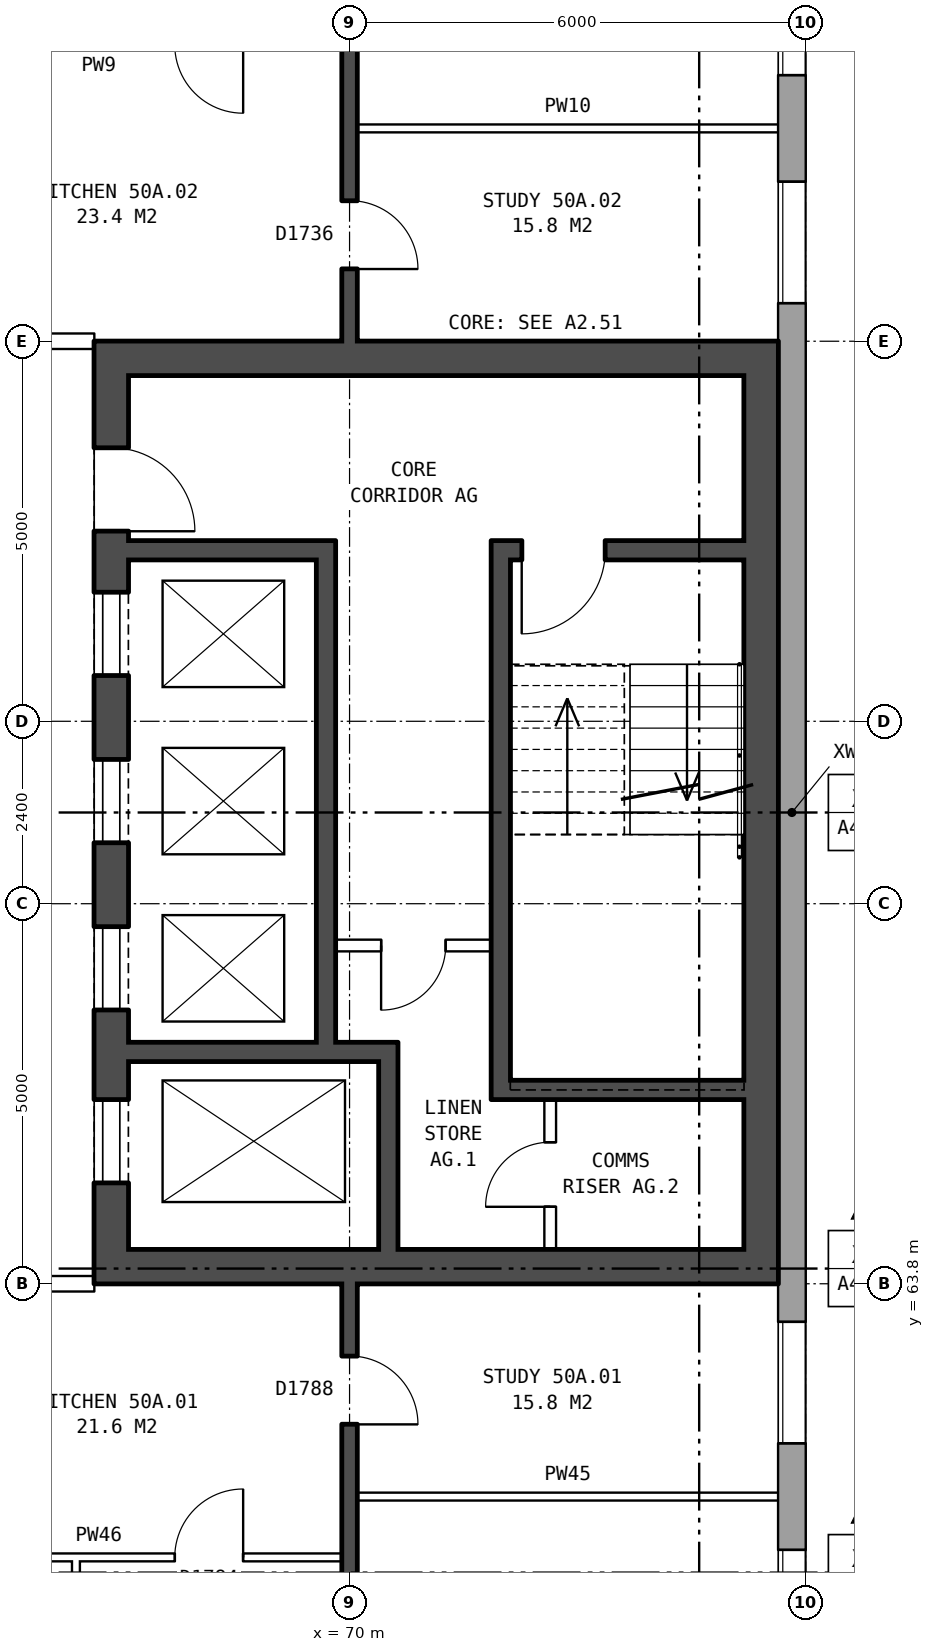
"""IFC4 building model, lengths in metres.
Left out: names, types, materials, properties, quantities, classifications, styles, units other than length and angle.
Written with IfcOpenShell. Run it as: python <this file> out.ifc"""

import sys

from ifc_helpers import new_model, si_unit, direction, frame, frame_2d, origin, place, context, subcontext, project, spatial, rectangle, extrude, element, fill, save


model = new_model("IFC4")
c1 = context("Model", 3, precision=1e-05, world=origin(), true_north=direction((0.0, 1.0)))
c2 = subcontext(c1, "Body", "Model", "MODEL_VIEW")
j1 = project(units=[si_unit("LENGTHUNIT", "METRE"), si_unit("PLANEANGLEUNIT", "RADIAN")], contexts=[c1])
p1 = place(None, origin())
s1 = spatial("IfcSite", under=j1, at=p1, CompositionType="ELEMENT")
p2 = place(p1, origin())
s2 = spatial("IfcBuilding", under=s1, at=p2, CompositionType="ELEMENT")
p3 = place(p2, frame((0.0, 0.0, 178.9)))
s3 = spatial("IfcBuildingStorey", under=s2, at=p3, CompositionType="ELEMENT", Elevation=178.9)
p4 = place(p3, frame((75.82, 57.075, 0.0), z_axis=(0.0, 0.0, 1.0), x_axis=(0.0, 1.0, 0.0)))
e1 = element("IfcWall", 1, at=p4, inside=s3, PredefinedType="STANDARD", context=c2, shape_type="SweptSolid", body=[
    extrude(rectangle(XDim=25.851, YDim=0.36, at=frame_2d((12.925, 0.0))), origin(), (0.0, 0.0, 1.0), 2.85),
])
p5 = place(p4, frame((1.625, 0.0, 0.8)))
e2 = element("IfcOpeningElement", 2, at=p5, cuts=e1, PredefinedType="OPENING", context=c2, shape_type="SweptSolid", body=[
    extrude(rectangle(XDim=1.6, YDim=1.8, at=frame_2d((0.8, 0.9))), frame((0.0, 0.19, 0.0), z_axis=(0.0, -1.0, 0.0), x_axis=(1.0, 0.0, 0.0)), (0.0, 0.0, 1.0), 0.38),
])
p6 = place(p4, frame((4.625, 0.0, 0.8)))
e3 = element("IfcOpeningElement", 3, at=p6, cuts=e1, PredefinedType="OPENING", context=c2, shape_type="SweptSolid", body=[
    extrude(rectangle(XDim=1.6, YDim=1.8, at=frame_2d((0.8, 0.9))), frame((0.0, 0.19, 0.0), z_axis=(0.0, -1.0, 0.0), x_axis=(1.0, 0.0, 0.0)), (0.0, 0.0, 1.0), 0.38),
])
p7 = place(p4, frame((19.625, 0.0, 0.8)))
e4 = element("IfcOpeningElement", 4, at=p7, cuts=e1, PredefinedType="OPENING", context=c2, shape_type="SweptSolid", body=[
    extrude(rectangle(XDim=1.6, YDim=1.8, at=frame_2d((0.8, 0.9))), frame((0.0, 0.19, 0.0), z_axis=(0.0, -1.0, 0.0), x_axis=(1.0, 0.0, 0.0)), (0.0, 0.0, 1.0), 0.38),
])
p8 = place(p4, frame((22.625, 0.0, 0.8)))
e5 = element("IfcOpeningElement", 5, at=p8, cuts=e1, PredefinedType="OPENING", context=c2, shape_type="SweptSolid", body=[
    extrude(rectangle(XDim=1.6, YDim=1.8, at=frame_2d((0.8, 0.9))), frame((0.0, 0.19, 0.0), z_axis=(0.0, -1.0, 0.0), x_axis=(1.0, 0.0, 0.0)), (0.0, 0.0, 1.0), 0.38),
])
p9 = place(p3, frame((66.865, 63.8, 0.0), z_axis=(0.0, 0.0, 1.0), x_axis=(0.0, 1.0, 0.0)))
e6 = element("IfcWall", 6, at=p9, inside=s3, PredefinedType="SHEAR", context=c2, shape_type="SweptSolid", body=[
    extrude(rectangle(XDim=12.4, YDim=0.45, at=frame_2d((6.2, 0.0))), origin(), (0.0, 0.0, 1.0), 2.85),
])
p10 = place(p9, frame((1.325, 0.0, 0.0)))
e7 = element("IfcOpeningElement", 7, at=p10, cuts=e6, PredefinedType="OPENING", context=c2, shape_type="SweptSolid", body=[
    extrude(rectangle(XDim=1.1, YDim=2.1, at=frame_2d((0.55, 1.05))), frame((0.0, 0.235, 0.0), z_axis=(0.0, -1.0, 0.0), x_axis=(1.0, 0.0, 0.0)), (0.0, 0.0, 1.0), 0.47),
])
p11 = place(p9, frame((3.6, 0.0, 0.0)))
e8 = element("IfcOpeningElement", 8, at=p11, cuts=e6, PredefinedType="OPENING", context=c2, shape_type="SweptSolid", body=[
    extrude(rectangle(XDim=1.1, YDim=2.1, at=frame_2d((0.55, 1.05))), frame((0.0, 0.235, 0.0), z_axis=(0.0, -1.0, 0.0), x_axis=(1.0, 0.0, 0.0)), (0.0, 0.0, 1.0), 0.47),
])
p12 = place(p9, frame((5.8, 0.0, 0.0)))
e9 = element("IfcOpeningElement", 9, at=p12, cuts=e6, PredefinedType="OPENING", context=c2, shape_type="SweptSolid", body=[
    extrude(rectangle(XDim=1.1, YDim=2.1, at=frame_2d((0.55, 1.05))), frame((0.0, 0.235, 0.0), z_axis=(0.0, -1.0, 0.0), x_axis=(1.0, 0.0, 0.0)), (0.0, 0.0, 1.0), 0.47),
])
p13 = place(p9, frame((8.0, 0.0, 0.0)))
e10 = element("IfcOpeningElement", 10, at=p13, cuts=e6, PredefinedType="OPENING", context=c2, shape_type="SweptSolid", body=[
    extrude(rectangle(XDim=1.1, YDim=2.1, at=frame_2d((0.55, 1.05))), frame((0.0, 0.235, 0.0), z_axis=(0.0, -1.0, 0.0), x_axis=(1.0, 0.0, 0.0)), (0.0, 0.0, 1.0), 0.47),
])
p14 = place(p9, frame((9.9, 0.0, 0.0)))
e11 = element("IfcOpeningElement", 11, at=p14, cuts=e6, PredefinedType="OPENING", context=c2, shape_type="SweptSolid", body=[
    extrude(rectangle(XDim=1.1, YDim=2.1, at=frame_2d((0.55, 1.05))), frame((0.0, 0.235, 0.0), z_axis=(0.0, -1.0, 0.0), x_axis=(1.0, 0.0, 0.0)), (0.0, 0.0, 1.0), 0.47),
])
p15 = place(p3, frame((75.415, 63.8, 0.0), z_axis=(0.0, 0.0, 1.0), x_axis=(0.0, 1.0, 0.0)))
e12 = element("IfcWall", 12, at=p15, inside=s3, PredefinedType="SHEAR", context=c2, shape_type="SweptSolid", body=[
    extrude(rectangle(XDim=12.4, YDim=0.45, at=frame_2d((6.2, 0.0))), origin(), (0.0, 0.0, 1.0), 2.85),
])
for number, where, z_axis, x_axis in (
    (13, (67.09, 64.025, 0.0), (0.0, 0.0, 1.0), (1.0, 0.0, 0.0)),
    (14, (67.09, 75.975, 0.0), (0.0, 0.0, 1.0), (1.0, 0.0, 0.0)),
):
    element("IfcWall", number, at=place(p3, frame(where, z_axis=z_axis, x_axis=x_axis)), inside=s3, PredefinedType="SHEAR", context=c2, shape_type="SweptSolid", body=[
        extrude(rectangle(XDim=8.1, YDim=0.45, at=frame_2d((4.05, 0.0))), origin(), (0.0, 0.0, 1.0), 2.85),
    ])
p16 = place(p3, frame((72.115, 66.35, 0.0), z_axis=(0.0, 0.0, 1.0), x_axis=(1.0, 0.0, 0.0)))
e15 = element("IfcWall", 15, at=p16, inside=s3, PredefinedType="SHEAR", context=c2, shape_type="SweptSolid", body=[
    extrude(rectangle(XDim=3.075, YDim=0.25, at=frame_2d((1.538, 0.0))), origin(), (0.0, 0.0, 1.0), 2.85),
])
p17 = place(p3, frame((67.09, 66.85, 0.0), z_axis=(0.0, 0.0, 1.0), x_axis=(1.0, 0.0, 0.0)))
e16 = element("IfcWall", 16, at=p17, inside=s3, PredefinedType="SHEAR", context=c2, shape_type="SweptSolid", body=[
    extrude(rectangle(XDim=3.545, YDim=0.25, at=frame_2d((1.772, 0.0))), origin(), (0.0, 0.0, 1.0), 2.85),
])
p18 = place(p3, frame((69.815, 68.25, 0.0), z_axis=(0.0, 0.0, 1.0), x_axis=(1.0, 0.0, 0.0)))
e17 = element("IfcWall", 17, at=p18, inside=s3, PredefinedType="PARTITIONING", context=c2, shape_type="SweptSolid", body=[
    extrude(rectangle(XDim=2.05, YDim=0.15, at=frame_2d((1.025, 0.0))), origin(), (0.0, 0.0, 1.0), 2.85),
])
p19 = place(p18, frame((0.6, 0.0, 0.0)))
e18 = element("IfcOpeningElement", 18, at=p19, cuts=e17, PredefinedType="OPENING", context=c2, shape_type="SweptSolid", body=[
    extrude(rectangle(XDim=0.85, YDim=2.1, at=frame_2d((0.425, 1.05))), frame((0.0, 0.085, 0.0), z_axis=(0.0, -1.0, 0.0), x_axis=(1.0, 0.0, 0.0)), (0.0, 0.0, 1.0), 0.17),
])
p20 = place(p3, frame((67.09, 73.45, 0.0), z_axis=(0.0, 0.0, 1.0), x_axis=(1.0, 0.0, 0.0)))
e19 = element("IfcWall", 19, at=p20, inside=s3, PredefinedType="SHEAR", context=c2, shape_type="SweptSolid", body=[
    extrude(rectangle(XDim=2.475, YDim=0.25, at=frame_2d((1.237, 0.0))), origin(), (0.0, 0.0, 1.0), 2.85),
])
p21 = place(p3, frame((72.115, 73.45, 0.0), z_axis=(0.0, 0.0, 1.0), x_axis=(1.0, 0.0, 0.0)))
e20 = element("IfcWall", 20, at=p21, inside=s3, PredefinedType="SHEAR", context=c2, shape_type="SweptSolid", body=[
    extrude(rectangle(XDim=3.075, YDim=0.25, at=frame_2d((1.538, 0.0))), origin(), (0.0, 0.0, 1.0), 2.85),
])
p22 = place(p21, frame((0.15, 0.0, 0.0)))
e21 = element("IfcOpeningElement", 21, at=p22, cuts=e20, PredefinedType="OPENING", context=c2, shape_type="SweptSolid", body=[
    extrude(rectangle(XDim=1.1, YDim=2.1, at=frame_2d((0.55, 1.05))), frame((0.0, 0.135, 0.0), z_axis=(0.0, -1.0, 0.0), x_axis=(1.0, 0.0, 0.0)), (0.0, 0.0, 1.0), 0.27),
])
p23 = place(p3, frame((69.69, 66.975, 0.0), z_axis=(0.0, 0.0, 1.0), x_axis=(0.0, 1.0, 0.0)))
e22 = element("IfcWall", 22, at=p23, inside=s3, PredefinedType="SHEAR", context=c2, shape_type="SweptSolid", body=[
    extrude(rectangle(XDim=6.6, YDim=0.25, at=frame_2d((3.3, 0.0))), origin(), (0.0, 0.0, 1.0), 2.85),
])
p24 = place(p3, frame((70.51, 64.25, 0.0), z_axis=(0.0, 0.0, 1.0), x_axis=(0.0, 1.0, 0.0)))
e23 = element("IfcWall", 23, at=p24, inside=s3, PredefinedType="SHEAR", context=c2, shape_type="SweptSolid", body=[
    extrude(rectangle(XDim=2.475, YDim=0.25, at=frame_2d((1.238, 0.0))), origin(), (0.0, 0.0, 1.0), 2.85),
])
p25 = place(p3, frame((71.99, 66.225, 0.0), z_axis=(0.0, 0.0, 1.0), x_axis=(0.0, 1.0, 0.0)))
e24 = element("IfcWall", 24, at=p25, inside=s3, PredefinedType="SHEAR", context=c2, shape_type="SweptSolid", body=[
    extrude(rectangle(XDim=7.35, YDim=0.25, at=frame_2d((3.675, 0.0))), origin(), (0.0, 0.0, 1.0), 2.85),
])
p26 = place(p3, frame((72.64, 64.25, 0.0), z_axis=(0.0, 0.0, 1.0), x_axis=(0.0, 1.0, 0.0)))
e25 = element("IfcWall", 25, at=p26, inside=s3, PredefinedType="PARTITIONING", context=c2, shape_type="SweptSolid", body=[
    extrude(rectangle(XDim=1.975, YDim=0.15, at=frame_2d((0.988, 0.0))), origin(), (0.0, 0.0, 1.0), 2.85),
])
p27 = place(p26, frame((0.562, 0.0, 0.0)))
e26 = element("IfcOpeningElement", 26, at=p27, cuts=e25, PredefinedType="OPENING", context=c2, shape_type="SweptSolid", body=[
    extrude(rectangle(XDim=0.85, YDim=2.1, at=frame_2d((0.425, 1.05))), frame((0.0, 0.085, 0.0), z_axis=(0.0, -1.0, 0.0), x_axis=(1.0, 0.0, 0.0)), (0.0, 0.0, 1.0), 0.17),
])
p28 = place(p3, frame((64.1, 60.2, 0.0), z_axis=(0.0, 0.0, 1.0), x_axis=(1.0, 0.0, 0.0)))
e27 = element("IfcWall", 27, at=p28, inside=s3, PredefinedType="PARTITIONING", context=c2, shape_type="SweptSolid", body=[
    extrude(rectangle(XDim=5.8, YDim=0.1, at=frame_2d((2.9, 0.0))), origin(), (0.0, 0.0, 1.0), 2.85),
])
p29 = place(p28, frame((3.6, 0.0, 0.0)))
e28 = element("IfcOpeningElement", 28, at=p29, cuts=e27, PredefinedType="OPENING", context=c2, shape_type="SweptSolid", body=[
    extrude(rectangle(XDim=0.9, YDim=2.1, at=frame_2d((0.45, 1.05))), frame((0.0, 0.06, 0.0), z_axis=(0.0, -1.0, 0.0), x_axis=(1.0, 0.0, 0.0)), (0.0, 0.0, 1.0), 0.12),
])
p30 = place(p28, frame((0.7, 0.0, 0.0)))
e29 = element("IfcOpeningElement", 29, at=p30, cuts=e27, PredefinedType="OPENING", context=c2, shape_type="SweptSolid", body=[
    extrude(rectangle(XDim=0.9, YDim=2.1, at=frame_2d((0.45, 1.05))), frame((0.0, 0.06, 0.0), z_axis=(0.0, -1.0, 0.0), x_axis=(1.0, 0.0, 0.0)), (0.0, 0.0, 1.0), 0.12),
])
p31 = place(p3, frame((70.1, 61.0, 0.0), z_axis=(0.0, 0.0, 1.0), x_axis=(1.0, 0.0, 0.0)))
e30 = element("IfcWall", 30, at=p31, inside=s3, PredefinedType="PARTITIONING", context=c2, shape_type="SweptSolid", body=[
    extrude(rectangle(XDim=5.54, YDim=0.1, at=frame_2d((2.77, 0.0))), origin(), (0.0, 0.0, 1.0), 2.85),
])
p32 = place(p3, frame((63.64, 63.8, 0.0), z_axis=(0.0, 0.0, 1.0), x_axis=(1.0, 0.0, 0.0)))
e31 = element("IfcWall", 31, at=p32, inside=s3, PredefinedType="PARTITIONING", context=c2, shape_type="SweptSolid", body=[
    extrude(rectangle(XDim=3.0, YDim=0.2, at=frame_2d((1.5, 0.0))), origin(), (0.0, 0.0, 1.0), 2.85),
])
p33 = place(p32, frame((1.18, 0.0, 0.0)))
e32 = element("IfcOpeningElement", 32, at=p33, cuts=e31, PredefinedType="OPENING", context=c2, shape_type="SweptSolid", body=[
    extrude(rectangle(XDim=1.0, YDim=2.1, at=frame_2d((0.5, 1.05))), frame((0.0, 0.11, 0.0), z_axis=(0.0, -1.0, 0.0), x_axis=(1.0, 0.0, 0.0)), (0.0, 0.0, 1.0), 0.22),
])
p34 = place(p3, frame((63.64, 76.2, 0.0), z_axis=(0.0, 0.0, 1.0), x_axis=(1.0, 0.0, 0.0)))
e33 = element("IfcWall", 33, at=p34, inside=s3, PredefinedType="PARTITIONING", context=c2, shape_type="SweptSolid", body=[
    extrude(rectangle(XDim=3.0, YDim=0.2, at=frame_2d((1.5, 0.0))), origin(), (0.0, 0.0, 1.0), 2.85),
])
p35 = place(p34, frame((1.18, 0.0, 0.0)))
e34 = element("IfcOpeningElement", 34, at=p35, cuts=e33, PredefinedType="OPENING", context=c2, shape_type="SweptSolid", body=[
    extrude(rectangle(XDim=1.0, YDim=2.1, at=frame_2d((0.5, 1.05))), frame((0.0, 0.11, 0.0), z_axis=(0.0, -1.0, 0.0), x_axis=(1.0, 0.0, 0.0)), (0.0, 0.0, 1.0), 0.22),
])
p36 = place(p3, frame((70.1, 79.0, 0.0), z_axis=(0.0, 0.0, 1.0), x_axis=(1.0, 0.0, 0.0)))
e35 = element("IfcWall", 35, at=p36, inside=s3, PredefinedType="PARTITIONING", context=c2, shape_type="SweptSolid", body=[
    extrude(rectangle(XDim=5.54, YDim=0.1, at=frame_2d((2.77, 0.0))), origin(), (0.0, 0.0, 1.0), 2.85),
])
p37 = place(p3, frame((66.4, 57.85, 0.0), z_axis=(0.0, 0.0, 1.0), x_axis=(0.0, 1.0, 0.0)))
e36 = element("IfcWall", 36, at=p37, inside=s3, PredefinedType="PARTITIONING", context=c2, shape_type="SweptSolid", body=[
    extrude(rectangle(XDim=2.3, YDim=0.1, at=frame_2d((1.15, 0.0))), origin(), (0.0, 0.0, 1.0), 2.85),
])
p38 = place(p3, frame((70.0, 54.36, 0.0), z_axis=(0.0, 0.0, 1.0), x_axis=(0.0, 1.0, 0.0)))
e37 = element("IfcWall", 37, at=p38, inside=s3, PredefinedType="SOLIDWALL", context=c2, shape_type="SweptSolid", body=[
    extrude(rectangle(XDim=9.44, YDim=0.2, at=frame_2d((4.72, 0.0))), origin(), (0.0, 0.0, 1.0), 2.85),
])
p39 = place(p38, frame((2.47, 0.0, 0.0)))
e38 = element("IfcOpeningElement", 38, at=p39, cuts=e37, PredefinedType="OPENING", context=c2, shape_type="SweptSolid", body=[
    extrude(rectangle(XDim=0.9, YDim=2.1, at=frame_2d((0.45, 1.05))), frame((0.0, 0.11, 0.0), z_axis=(0.0, -1.0, 0.0), x_axis=(1.0, 0.0, 0.0)), (0.0, 0.0, 1.0), 0.22),
])
p40 = place(p38, frame((7.59, 0.0, 0.0)))
e39 = element("IfcOpeningElement", 39, at=p40, cuts=e37, PredefinedType="OPENING", context=c2, shape_type="SweptSolid", body=[
    extrude(rectangle(XDim=0.9, YDim=2.1, at=frame_2d((0.45, 1.05))), frame((0.0, 0.11, 0.0), z_axis=(0.0, -1.0, 0.0), x_axis=(1.0, 0.0, 0.0)), (0.0, 0.0, 1.0), 0.22),
])
p41 = place(p3, frame((70.0, 76.2, 0.0), z_axis=(0.0, 0.0, 1.0), x_axis=(0.0, 1.0, 0.0)))
e40 = element("IfcWall", 40, at=p41, inside=s3, PredefinedType="SOLIDWALL", context=c2, shape_type="SweptSolid", body=[
    extrude(rectangle(XDim=9.44, YDim=0.2, at=frame_2d((4.72, 0.0))), origin(), (0.0, 0.0, 1.0), 2.85),
])
p42 = place(p41, frame((6.22, 0.0, 0.0)))
e41 = element("IfcOpeningElement", 41, at=p42, cuts=e40, PredefinedType="OPENING", context=c2, shape_type="SweptSolid", body=[
    extrude(rectangle(XDim=0.9, YDim=2.1, at=frame_2d((0.45, 1.05))), frame((0.0, 0.11, 0.0), z_axis=(0.0, -1.0, 0.0), x_axis=(1.0, 0.0, 0.0)), (0.0, 0.0, 1.0), 0.22),
])
p43 = place(p41, frame((0.95, 0.0, 0.0)))
e42 = element("IfcOpeningElement", 42, at=p43, cuts=e40, PredefinedType="OPENING", context=c2, shape_type="SweptSolid", body=[
    extrude(rectangle(XDim=0.9, YDim=2.1, at=frame_2d((0.45, 1.05))), frame((0.0, 0.11, 0.0), z_axis=(0.0, -1.0, 0.0), x_axis=(1.0, 0.0, 0.0)), (0.0, 0.0, 1.0), 0.22),
])
p44 = place(p5, origin())
e43 = element("IfcWindow", 43, at=p44, inside=s3, PartitioningType="SINGLE_PANEL", PredefinedType="WINDOW", context=c2, shape_type="SweptSolid", body=[
    extrude(rectangle(XDim=1.6, YDim=1.8, at=frame_2d((0.8, 0.9))), frame((0.0, 0.15, 0.0), z_axis=(0.0, -1.0, 0.0), x_axis=(1.0, 0.0, 0.0)), (0.0, 0.0, 1.0), 0.06),
])
fill(e2, e43)
p45 = place(p6, origin())
e44 = element("IfcWindow", 44, at=p45, inside=s3, PartitioningType="SINGLE_PANEL", PredefinedType="WINDOW", context=c2, shape_type="SweptSolid", body=[
    extrude(rectangle(XDim=1.6, YDim=1.8, at=frame_2d((0.8, 0.9))), frame((0.0, 0.15, 0.0), z_axis=(0.0, -1.0, 0.0), x_axis=(1.0, 0.0, 0.0)), (0.0, 0.0, 1.0), 0.06),
])
fill(e3, e44)
p46 = place(p7, origin())
e45 = element("IfcWindow", 45, at=p46, inside=s3, PartitioningType="SINGLE_PANEL", PredefinedType="WINDOW", context=c2, shape_type="SweptSolid", body=[
    extrude(rectangle(XDim=1.6, YDim=1.8, at=frame_2d((0.8, 0.9))), frame((0.0, 0.15, 0.0), z_axis=(0.0, -1.0, 0.0), x_axis=(1.0, 0.0, 0.0)), (0.0, 0.0, 1.0), 0.06),
])
fill(e4, e45)
p47 = place(p8, origin())
e46 = element("IfcWindow", 46, at=p47, inside=s3, PartitioningType="SINGLE_PANEL", PredefinedType="WINDOW", context=c2, shape_type="SweptSolid", body=[
    extrude(rectangle(XDim=1.6, YDim=1.8, at=frame_2d((0.8, 0.9))), frame((0.0, 0.15, 0.0), z_axis=(0.0, -1.0, 0.0), x_axis=(1.0, 0.0, 0.0)), (0.0, 0.0, 1.0), 0.06),
])
fill(e5, e46)
p48 = place(p10, origin())
e47 = element("IfcDoor", 47, at=p48, inside=s3, OperationType="DOUBLE_DOOR_SLIDING", PredefinedType="DOOR", context=c2, shape_type="SweptSolid", body=[
    extrude(rectangle(XDim=1.1, YDim=2.1, at=frame_2d((0.55, 1.05))), frame((0.0, -0.16, 0.0), z_axis=(0.0, -1.0, 0.0), x_axis=(1.0, 0.0, 0.0)), (0.0, 0.0, 1.0), 0.05),
])
fill(e7, e47)
p49 = place(p11, origin())
e48 = element("IfcDoor", 48, at=p49, inside=s3, OperationType="DOUBLE_DOOR_SLIDING", PredefinedType="DOOR", context=c2, shape_type="SweptSolid", body=[
    extrude(rectangle(XDim=1.1, YDim=2.1, at=frame_2d((0.55, 1.05))), frame((0.0, -0.16, 0.0), z_axis=(0.0, -1.0, 0.0), x_axis=(1.0, 0.0, 0.0)), (0.0, 0.0, 1.0), 0.05),
])
fill(e8, e48)
p50 = place(p12, origin())
e49 = element("IfcDoor", 49, at=p50, inside=s3, OperationType="DOUBLE_DOOR_SLIDING", PredefinedType="DOOR", context=c2, shape_type="SweptSolid", body=[
    extrude(rectangle(XDim=1.1, YDim=2.1, at=frame_2d((0.55, 1.05))), frame((0.0, -0.16, 0.0), z_axis=(0.0, -1.0, 0.0), x_axis=(1.0, 0.0, 0.0)), (0.0, 0.0, 1.0), 0.05),
])
fill(e9, e49)
p51 = place(p13, origin())
e50 = element("IfcDoor", 50, at=p51, inside=s3, OperationType="DOUBLE_DOOR_SLIDING", PredefinedType="DOOR", context=c2, shape_type="SweptSolid", body=[
    extrude(rectangle(XDim=1.1, YDim=2.1, at=frame_2d((0.55, 1.05))), frame((0.0, -0.16, 0.0), z_axis=(0.0, -1.0, 0.0), x_axis=(1.0, 0.0, 0.0)), (0.0, 0.0, 1.0), 0.05),
])
fill(e10, e50)
p52 = place(p14, frame((1.1, 0.0, 0.0), z_axis=(0.0, 0.0, 1.0), x_axis=(-1.0, 0.0, 0.0)))
e51 = element("IfcDoor", 51, at=p52, inside=s3, OperationType="SINGLE_SWING_RIGHT", PredefinedType="DOOR", context=c2, shape_type="SweptSolid", body=[
    extrude(rectangle(XDim=1.1, YDim=2.1, at=frame_2d((0.55, 1.05))), frame((0.0, 0.21, 0.0), z_axis=(0.0, -1.0, 0.0), x_axis=(1.0, 0.0, 0.0)), (0.0, 0.0, 1.0), 0.05),
])
fill(e11, e51)
p53 = place(p22, frame((1.1, 0.0, 0.0), z_axis=(0.0, 0.0, 1.0), x_axis=(-1.0, 0.0, 0.0)))
e52 = element("IfcDoor", 52, at=p53, inside=s3, OperationType="SINGLE_SWING_RIGHT", PredefinedType="DOOR", context=c2, shape_type="SweptSolid", body=[
    extrude(rectangle(XDim=1.1, YDim=2.1, at=frame_2d((0.55, 1.05))), frame((0.0, 0.025, 0.0), z_axis=(0.0, -1.0, 0.0), x_axis=(1.0, 0.0, 0.0)), (0.0, 0.0, 1.0), 0.05),
])
fill(e21, e52)
p54 = place(p19, frame((0.85, 0.0, 0.0), z_axis=(0.0, 0.0, 1.0), x_axis=(-1.0, 0.0, 0.0)))
e53 = element("IfcDoor", 53, at=p54, inside=s3, OperationType="SINGLE_SWING_RIGHT", PredefinedType="DOOR", context=c2, shape_type="SweptSolid", body=[
    extrude(rectangle(XDim=0.85, YDim=2.1, at=frame_2d((0.425, 1.05))), frame((0.0, 0.025, 0.0), z_axis=(0.0, -1.0, 0.0), x_axis=(1.0, 0.0, 0.0)), (0.0, 0.0, 1.0), 0.05),
])
fill(e18, e53)
p55 = place(p27, origin())
e54 = element("IfcDoor", 54, at=p55, inside=s3, OperationType="SINGLE_SWING_LEFT", PredefinedType="DOOR", context=c2, shape_type="SweptSolid", body=[
    extrude(rectangle(XDim=0.85, YDim=2.1, at=frame_2d((0.425, 1.05))), frame((0.0, 0.025, 0.0), z_axis=(0.0, -1.0, 0.0), x_axis=(1.0, 0.0, 0.0)), (0.0, 0.0, 1.0), 0.05),
])
fill(e26, e54)
p56 = place(p40, frame((0.9, 0.0, 0.0), z_axis=(0.0, 0.0, 1.0), x_axis=(-1.0, 0.0, 0.0)))
e55 = element("IfcDoor", 55, at=p56, inside=s3, OperationType="SINGLE_SWING_RIGHT", PredefinedType="DOOR", context=c2, shape_type="SweptSolid", body=[
    extrude(rectangle(XDim=0.9, YDim=2.1, at=frame_2d((0.45, 1.05))), frame((0.0, 0.025, 0.0), z_axis=(0.0, -1.0, 0.0), x_axis=(1.0, 0.0, 0.0)), (0.0, 0.0, 1.0), 0.05),
])
fill(e39, e55)
p57 = place(p29, origin())
e56 = element("IfcDoor", 56, at=p57, inside=s3, OperationType="SINGLE_SWING_RIGHT", PredefinedType="DOOR", context=c2, shape_type="SweptSolid", body=[
    extrude(rectangle(XDim=0.9, YDim=2.1, at=frame_2d((0.45, 1.05))), frame((0.0, 0.025, 0.0), z_axis=(0.0, -1.0, 0.0), x_axis=(1.0, 0.0, 0.0)), (0.0, 0.0, 1.0), 0.05),
])
fill(e28, e56)
p58 = place(p43, frame((0.9, 0.0, 0.0), z_axis=(0.0, 0.0, 1.0), x_axis=(-1.0, 0.0, 0.0)))
e57 = element("IfcDoor", 57, at=p58, inside=s3, OperationType="SINGLE_SWING_RIGHT", PredefinedType="DOOR", context=c2, shape_type="SweptSolid", body=[
    extrude(rectangle(XDim=0.9, YDim=2.1, at=frame_2d((0.45, 1.05))), frame((0.0, 0.025, 0.0), z_axis=(0.0, -1.0, 0.0), x_axis=(1.0, 0.0, 0.0)), (0.0, 0.0, 1.0), 0.05),
])
fill(e42, e57)
save(model, sys.argv[1])
